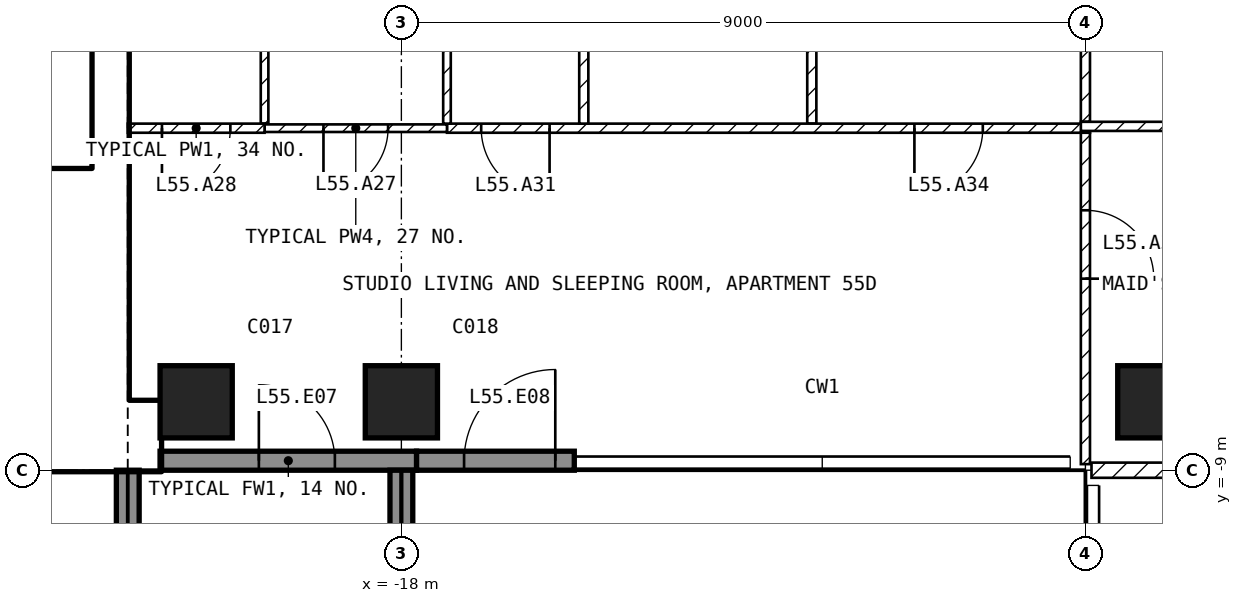
"""IFC4 building model, lengths in metres.
Left out: names, types, materials, properties, quantities, classifications, styles, units other than length and angle.
Written with IfcOpenShell. Run it as: python <this file> out.ifc"""

import sys

from ifc_helpers import new_model, si_unit, direction, frame, frame_2d, origin, origin_2d, place, context, subcontext, project, spatial, rectangle, extrude, element, fill, save


model = new_model("IFC4")
c1 = context("Model", 3, precision=1e-05, world=origin(), true_north=direction((0.0, 1.0)))
c2 = subcontext(c1, "Body", "Model", "MODEL_VIEW")
j1 = project(units=[si_unit("LENGTHUNIT", "METRE"), si_unit("PLANEANGLEUNIT", "RADIAN")], contexts=[c1])
p1 = place(None, origin())
s1 = spatial("IfcSite", under=j1, at=p1, CompositionType="ELEMENT")
p2 = place(p1, origin())
s2 = spatial("IfcBuilding", under=s1, at=p2, CompositionType="ELEMENT")
p3 = place(p2, frame((0.0, 0.0, 219.1)))
s3 = spatial("IfcBuildingStorey", under=s2, at=p3, CompositionType="ELEMENT", Elevation=219.1)
for number, where, z_axis, x_axis in (
    (1, (-20.7, -8.1, -0.25), (0.0, 0.0, 1.0), (1.0, 0.0, 0.0)),
    (2, (-18.0, -8.1, -0.25), (0.0, 0.0, 1.0), (1.0, 0.0, 0.0)),
    (3, (-8.1, -8.1, -0.25), (0.0, 0.0, 1.0), (1.0, 0.0, 0.0)),
):
    element("IfcColumn", number, at=place(p3, frame(where, z_axis=z_axis, x_axis=x_axis)), inside=s3, PredefinedType="COLUMN", context=c2, shape_type="SweptSolid", body=[
        extrude(rectangle(XDim=0.95, YDim=0.95, at=origin_2d()), origin(), (0.0, 0.0, 1.0), 3.45),
    ])
p4 = place(p3, frame((-21.175, -8.875, 0.0), z_axis=(0.0, 0.0, 1.0), x_axis=(1.0, 0.0, 0.0)))
e4 = element("IfcWall", 4, at=p4, inside=s3, PredefinedType="SOLIDWALL", context=c2, shape_type="SweptSolid", body=[
    extrude(rectangle(XDim=3.375, YDim=0.25, at=frame_2d((1.688, 0.0))), origin(), (0.0, 0.0, 1.0), 3.2),
])
p5 = place(p4, frame((1.3, 0.0, 0.0)))
e5 = element("IfcOpeningElement", 5, at=p5, cuts=e4, PredefinedType="OPENING", context=c2, shape_type="SweptSolid", body=[
    extrude(rectangle(XDim=1.0, YDim=2.4, at=frame_2d((0.5, 1.2))), frame((0.0, 0.135, 0.0), z_axis=(0.0, -1.0, 0.0), x_axis=(1.0, 0.0, 0.0)), (0.0, 0.0, 1.0), 0.27),
])
p6 = place(p3, frame((-17.8, -8.875, 0.0), z_axis=(0.0, 0.0, 1.0), x_axis=(1.0, 0.0, 0.0)))
e6 = element("IfcWall", 6, at=p6, inside=s3, PredefinedType="SOLIDWALL", context=c2, shape_type="SweptSolid", body=[
    extrude(rectangle(XDim=2.075, YDim=0.25, at=frame_2d((1.038, 0.0))), origin(), (0.0, 0.0, 1.0), 3.2),
])
p7 = place(p6, frame((0.625, 0.0, 0.0)))
e7 = element("IfcOpeningElement", 7, at=p7, cuts=e6, PredefinedType="OPENING", context=c2, shape_type="SweptSolid", body=[
    extrude(rectangle(XDim=1.2, YDim=2.4, at=frame_2d((0.6, 1.2))), frame((0.0, 0.135, 0.0), z_axis=(0.0, -1.0, 0.0), x_axis=(1.0, 0.0, 0.0)), (0.0, 0.0, 1.0), 0.27),
])
for number, where, z_axis, x_axis in (
    (8, (-21.6, -9.0, 0.0), (0.0, 0.0, 1.0), (0.0, -1.0, 0.0)),
    (9, (-18.0, -9.0, 0.0), (0.0, 0.0, 1.0), (0.0, -1.0, 0.0)),
):
    element("IfcWall", number, at=place(p3, frame(where, z_axis=z_axis, x_axis=x_axis)), inside=s3, PredefinedType="SOLIDWALL", context=c2, shape_type="SweptSolid", body=[
        extrude(rectangle(XDim=2.7, YDim=0.3, at=frame_2d((1.35, 0.0))), origin(), (0.0, 0.0, 1.0), 3.2),
    ])
p8 = place(p3, frame((-30.2, -8.55, 0.0), z_axis=(0.0, 0.0, 1.0), x_axis=(1.0, 0.0, 0.0)))
e10 = element("IfcWall", 10, at=p8, inside=s3, PredefinedType="SHEAR", context=c2, shape_type="SweptSolid", body=[
    extrude(rectangle(XDim=9.025, YDim=0.9, at=frame_2d((4.512, 0.0))), origin(), (0.0, 0.0, 1.0), 3.2),
])
p9 = place(p3, frame((-21.825, -8.1, 0.0), z_axis=(0.0, 0.0, 1.0), x_axis=(0.0, 1.0, 0.0)))
e11 = element("IfcWall", 11, at=p9, inside=s3, PredefinedType="SHEAR", context=c2, shape_type="SweptSolid", body=[
    extrude(rectangle(XDim=6.9, YDim=0.45, at=frame_2d((3.45, 0.0))), origin(), (0.0, 0.0, 1.0), 3.2),
])
p10 = place(p3, frame((-28.35, -5.15, 0.0), z_axis=(0.0, 0.0, 1.0), x_axis=(1.0, 0.0, 0.0)))
e12 = element("IfcWall", 12, at=p10, inside=s3, PredefinedType="SOLIDWALL", context=c2, shape_type="SweptSolid", body=[
    extrude(rectangle(XDim=6.3, YDim=0.2, at=frame_2d((3.15, 0.0))), origin(), (0.0, 0.0, 1.0), 3.2),
])
p11 = place(p10, frame((5.1, 0.0, 0.0)))
e13 = element("IfcOpeningElement", 13, at=p11, cuts=e12, PredefinedType="OPENING", context=c2, shape_type="SweptSolid", body=[
    extrude(rectangle(XDim=1.0, YDim=2.1, at=frame_2d((0.5, 1.05))), frame((0.0, 0.11, 0.0), z_axis=(0.0, -1.0, 0.0), x_axis=(1.0, 0.0, 0.0)), (0.0, 0.0, 1.0), 0.22),
])
p12 = place(p3, frame((8.92, -9.0, 0.0), z_axis=(0.0, 0.0, 1.0), x_axis=(-1.0, 0.0, 0.0)))
e14 = element("IfcWall", 14, at=p12, inside=s3, PredefinedType="PARTITIONING", context=c2, shape_type="SweptSolid", body=[
    extrude(rectangle(XDim=17.84, YDim=0.2, at=frame_2d((8.92, 0.0))), origin(), (0.0, 0.0, 1.0), 3.2),
])
p13 = place(p12, frame((8.42, 0.0, 0.0)))
e15 = element("IfcOpeningElement", 15, at=p13, cuts=e14, PredefinedType="OPENING", context=c2, shape_type="SweptSolid", body=[
    extrude(rectangle(XDim=1.0, YDim=2.1, at=frame_2d((0.5, 1.05))), frame((0.0, 0.11, 0.0), z_axis=(0.0, -1.0, 0.0), x_axis=(1.0, 0.0, 0.0)), (0.0, 0.0, 1.0), 0.22),
])
p14 = place(p3, frame((-12.6, -4.44, 0.0), z_axis=(0.0, 0.0, 1.0), x_axis=(0.0, 1.0, 0.0)))
e16 = element("IfcWall", 16, at=p14, inside=s3, PredefinedType="PARTITIONING", context=c2, shape_type="SweptSolid", body=[
    extrude(rectangle(XDim=3.14, YDim=0.12, at=frame_2d((1.57, 0.0))), origin(), (0.0, 0.0, 1.0), 3.2),
])
p15 = place(p14, frame((1.12, 0.0, 0.0)))
e17 = element("IfcOpeningElement", 17, at=p15, cuts=e16, PredefinedType="OPENING", context=c2, shape_type="SweptSolid", body=[
    extrude(rectangle(XDim=0.9, YDim=2.1, at=frame_2d((0.45, 1.05))), frame((0.0, 0.07, 0.0), z_axis=(0.0, -1.0, 0.0), x_axis=(1.0, 0.0, 0.0)), (0.0, 0.0, 1.0), 0.14),
])
p16 = place(p3, frame((-8.94, -4.5, 0.0), z_axis=(0.0, 0.0, 1.0), x_axis=(-1.0, 0.0, 0.0)))
e18 = element("IfcWall", 18, at=p16, inside=s3, PredefinedType="PARTITIONING", context=c2, shape_type="SweptSolid", body=[
    extrude(rectangle(XDim=8.46, YDim=0.12, at=frame_2d((4.23, 0.0))), origin(), (0.0, 0.0, 1.0), 3.2),
])
p17 = place(p16, frame((7.11, 0.0, 0.0)))
e19 = element("IfcOpeningElement", 19, at=p17, cuts=e18, PredefinedType="OPENING", context=c2, shape_type="SweptSolid", body=[
    extrude(rectangle(XDim=0.9, YDim=2.1, at=frame_2d((0.45, 1.05))), frame((0.0, 0.07, 0.0), z_axis=(0.0, -1.0, 0.0), x_axis=(1.0, 0.0, 0.0)), (0.0, 0.0, 1.0), 0.14),
])
p18 = place(p16, frame((1.41, 0.0, 0.0)))
e20 = element("IfcOpeningElement", 20, at=p18, cuts=e18, PredefinedType="OPENING", context=c2, shape_type="SweptSolid", body=[
    extrude(rectangle(XDim=0.9, YDim=2.1, at=frame_2d((0.45, 1.05))), frame((0.0, 0.07, 0.0), z_axis=(0.0, -1.0, 0.0), x_axis=(1.0, 0.0, 0.0)), (0.0, 0.0, 1.0), 0.14),
])
p19 = place(p3, frame((-9.0, -1.3, 0.0), z_axis=(0.0, 0.0, 1.0), x_axis=(0.0, -1.0, 0.0)))
e21 = element("IfcWall", 21, at=p19, inside=s3, PredefinedType="PARTITIONING", context=c2, shape_type="SweptSolid", body=[
    extrude(rectangle(XDim=3.116, YDim=0.12, at=frame_2d((1.558, 0.0))), origin(), (0.0, 0.0, 1.0), 3.2),
])
p20 = place(p19, frame((1.108, 0.0, 0.0)))
e22 = element("IfcOpeningElement", 22, at=p20, cuts=e21, PredefinedType="OPENING", context=c2, shape_type="SweptSolid", body=[
    extrude(rectangle(XDim=0.9, YDim=2.1, at=frame_2d((0.45, 1.05))), frame((0.0, 0.07, 0.0), z_axis=(0.0, -1.0, 0.0), x_axis=(1.0, 0.0, 0.0)), (0.0, 0.0, 1.0), 0.14),
])
p21 = place(p3, frame((-15.6, -4.44, 0.0), z_axis=(0.0, 0.0, 1.0), x_axis=(0.0, 1.0, 0.0)))
e23 = element("IfcWall", 23, at=p21, inside=s3, PredefinedType="PARTITIONING", context=c2, shape_type="SweptSolid", body=[
    extrude(rectangle(XDim=3.14, YDim=0.12, at=frame_2d((1.57, 0.0))), origin(), (0.0, 0.0, 1.0), 3.2),
])
for number, where, z_axis, x_axis in (
    (24, (-17.4, -4.44, 0.0), (0.0, 0.0, 1.0), (0.0, 1.0, 0.0)),
    (25, (-19.8, -4.44, 0.0), (0.0, 0.0, 1.0), (0.0, 1.0, 0.0)),
):
    element("IfcWall", number, at=place(p3, frame(where, z_axis=z_axis, x_axis=x_axis)), inside=s3, PredefinedType="PARTITIONING", context=c2, shape_type="SweptSolid", body=[
        extrude(rectangle(XDim=3.14, YDim=0.1, at=frame_2d((1.57, 0.0))), origin(), (0.0, 0.0, 1.0), 3.2),
    ])
p22 = place(p3, frame((-17.4, -4.5, 0.0), z_axis=(0.0, 0.0, 1.0), x_axis=(-1.0, 0.0, 0.0)))
e26 = element("IfcWall", 26, at=p22, inside=s3, PredefinedType="PARTITIONING", context=c2, shape_type="SweptSolid", body=[
    extrude(rectangle(XDim=2.4, YDim=0.1, at=frame_2d((1.2, 0.0))), origin(), (0.0, 0.0, 1.0), 3.2),
])
p23 = place(p22, frame((0.775, 0.0, 0.0)))
e27 = element("IfcOpeningElement", 27, at=p23, cuts=e26, PredefinedType="OPENING", context=c2, shape_type="SweptSolid", body=[
    extrude(rectangle(XDim=0.85, YDim=2.1, at=frame_2d((0.425, 1.05))), frame((0.0, 0.06, 0.0), z_axis=(0.0, -1.0, 0.0), x_axis=(1.0, 0.0, 0.0)), (0.0, 0.0, 1.0), 0.12),
])
p24 = place(p3, frame((-19.8, -4.5, 0.0), z_axis=(0.0, 0.0, 1.0), x_axis=(-1.0, 0.0, 0.0)))
e28 = element("IfcWall", 28, at=p24, inside=s3, PredefinedType="PARTITIONING", context=c2, shape_type="SweptSolid", body=[
    extrude(rectangle(XDim=1.8, YDim=0.12, at=frame_2d((0.9, 0.0))), origin(), (0.0, 0.0, 1.0), 3.2),
])
p25 = place(p24, frame((0.45, 0.0, 0.0)))
e29 = element("IfcOpeningElement", 29, at=p25, cuts=e28, PredefinedType="OPENING", context=c2, shape_type="SweptSolid", body=[
    extrude(rectangle(XDim=0.9, YDim=2.1, at=frame_2d((0.45, 1.05))), frame((0.0, 0.07, 0.0), z_axis=(0.0, -1.0, 0.0), x_axis=(1.0, 0.0, 0.0)), (0.0, 0.0, 1.0), 0.14),
])
p26 = place(p3, frame((-9.0, -4.56, 0.0), z_axis=(0.0, 0.0, 1.0), x_axis=(0.0, -1.0, 0.0)))
e30 = element("IfcWall", 30, at=p26, inside=s3, PredefinedType="PARTITIONING", context=c2, shape_type="SweptSolid", body=[
    extrude(rectangle(XDim=4.36, YDim=0.12, at=frame_2d((2.18, 0.0))), origin(), (0.0, 0.0, 1.0), 3.2),
])
p27 = place(p26, frame((1.02, 0.0, 0.0)))
e31 = element("IfcOpeningElement", 31, at=p27, cuts=e30, PredefinedType="OPENING", context=c2, shape_type="SweptSolid", body=[
    extrude(rectangle(XDim=0.9, YDim=2.1, at=frame_2d((0.45, 1.05))), frame((0.0, 0.07, 0.0), z_axis=(0.0, -1.0, 0.0), x_axis=(1.0, 0.0, 0.0)), (0.0, 0.0, 1.0), 0.14),
])
p28 = place(p3, frame((-4.4, -4.476, 0.0), z_axis=(0.0, 0.0, 1.0), x_axis=(-1.0, 0.0, 0.0)))
e32 = element("IfcWall", 32, at=p28, inside=s3, PredefinedType="PARTITIONING", context=c2, shape_type="SweptSolid", body=[
    extrude(rectangle(XDim=4.66, YDim=0.12, at=frame_2d((2.33, 0.0))), origin(), (0.0, 0.0, 1.0), 3.2),
])
p29 = place(p5, origin())
e33 = element("IfcDoor", 33, at=p29, inside=s3, OperationType="SINGLE_SWING_LEFT", PredefinedType="DOOR", context=c2, shape_type="SweptSolid", body=[
    extrude(rectangle(XDim=1.0, YDim=2.4, at=frame_2d((0.5, 1.2))), frame((0.0, 0.025, 0.0), z_axis=(0.0, -1.0, 0.0), x_axis=(1.0, 0.0, 0.0)), (0.0, 0.0, 1.0), 0.05),
])
fill(e5, e33)
p30 = place(p7, origin())
e34 = element("IfcDoor", 34, at=p30, inside=s3, OperationType="SINGLE_SWING_RIGHT", PredefinedType="DOOR", context=c2, shape_type="SweptSolid", body=[
    extrude(rectangle(XDim=1.2, YDim=2.4, at=frame_2d((0.6, 1.2))), frame((0.0, 0.025, 0.0), z_axis=(0.0, -1.0, 0.0), x_axis=(1.0, 0.0, 0.0)), (0.0, 0.0, 1.0), 0.05),
])
fill(e7, e34)
p31 = place(p11, origin())
e35 = element("IfcDoor", 35, at=p31, inside=s3, OperationType="SINGLE_SWING_LEFT", PredefinedType="DOOR", context=c2, shape_type="SweptSolid", body=[
    extrude(rectangle(XDim=1.0, YDim=2.1, at=frame_2d((0.5, 1.05))), frame((0.0, 0.025, 0.0), z_axis=(0.0, -1.0, 0.0), x_axis=(1.0, 0.0, 0.0)), (0.0, 0.0, 1.0), 0.05),
])
fill(e13, e35)
p32 = place(p23, origin())
e36 = element("IfcDoor", 36, at=p32, inside=s3, OperationType="SINGLE_SWING_RIGHT", PredefinedType="DOOR", context=c2, shape_type="SweptSolid", body=[
    extrude(rectangle(XDim=0.85, YDim=2.1, at=frame_2d((0.425, 1.05))), frame((0.0, 0.025, 0.0), z_axis=(0.0, -1.0, 0.0), x_axis=(1.0, 0.0, 0.0)), (0.0, 0.0, 1.0), 0.05),
])
fill(e27, e36)
p33 = place(p25, origin())
e37 = element("IfcDoor", 37, at=p33, inside=s3, OperationType="SINGLE_SWING_RIGHT", PredefinedType="DOOR", context=c2, shape_type="SweptSolid", body=[
    extrude(rectangle(XDim=0.9, YDim=2.1, at=frame_2d((0.45, 1.05))), frame((0.0, 0.025, 0.0), z_axis=(0.0, -1.0, 0.0), x_axis=(1.0, 0.0, 0.0)), (0.0, 0.0, 1.0), 0.05),
])
fill(e29, e37)
p34 = place(p17, origin())
e38 = element("IfcDoor", 38, at=p34, inside=s3, OperationType="SINGLE_SWING_LEFT", PredefinedType="DOOR", context=c2, shape_type="SweptSolid", body=[
    extrude(rectangle(XDim=0.9, YDim=2.1, at=frame_2d((0.45, 1.05))), frame((0.0, 0.025, 0.0), z_axis=(0.0, -1.0, 0.0), x_axis=(1.0, 0.0, 0.0)), (0.0, 0.0, 1.0), 0.05),
])
fill(e19, e38)
p35 = place(p27, origin())
e39 = element("IfcDoor", 39, at=p35, inside=s3, OperationType="SINGLE_SWING_RIGHT", PredefinedType="DOOR", context=c2, shape_type="SweptSolid", body=[
    extrude(rectangle(XDim=0.9, YDim=2.1, at=frame_2d((0.45, 1.05))), frame((0.0, 0.025, 0.0), z_axis=(0.0, -1.0, 0.0), x_axis=(1.0, 0.0, 0.0)), (0.0, 0.0, 1.0), 0.05),
])
fill(e31, e39)
p36 = place(p18, origin())
e40 = element("IfcDoor", 40, at=p36, inside=s3, OperationType="SINGLE_SWING_RIGHT", PredefinedType="DOOR", context=c2, shape_type="SweptSolid", body=[
    extrude(rectangle(XDim=0.9, YDim=2.1, at=frame_2d((0.45, 1.05))), frame((0.0, 0.025, 0.0), z_axis=(0.0, -1.0, 0.0), x_axis=(1.0, 0.0, 0.0)), (0.0, 0.0, 1.0), 0.05),
])
fill(e20, e40)
save(model, sys.argv[1])
